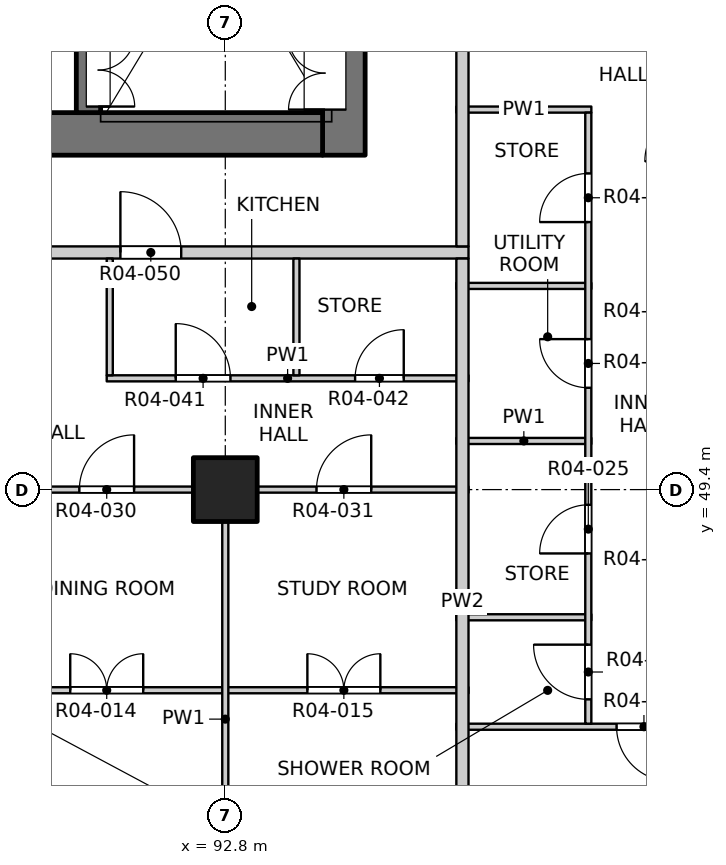
"""IFC4 building model, lengths in metres.
Left out: names, types, materials, properties, quantities, classifications, styles, units other than length and angle.
Written with IfcOpenShell. Run it as: python <this file> out.ifc"""

import sys

from ifc_helpers import new_model, si_unit, direction, frame, frame_2d, origin, origin_2d, place, context, subcontext, project, spatial, rectangle, extrude, element, fill, save


model = new_model("IFC4")
c1 = context("Model", 3, precision=1e-05, world=origin(), true_north=direction((0.0, 1.0)))
c2 = subcontext(c1, "Body", "Model", "MODEL_VIEW")
j1 = project(units=[si_unit("LENGTHUNIT", "METRE"), si_unit("PLANEANGLEUNIT", "RADIAN")], contexts=[c1])
p1 = place(None, origin())
s1 = spatial("IfcSite", under=j1, at=p1, CompositionType="ELEMENT")
p2 = place(p1, origin())
s2 = spatial("IfcBuilding", under=s1, at=p2, CompositionType="ELEMENT")
p3 = place(p2, frame((0.0, 0.0, 58.0)))
s3 = spatial("IfcBuildingStorey", under=s2, at=p3, CompositionType="ELEMENT", Elevation=58.0)
p4 = place(p3, frame((92.8, 49.4, -0.25), z_axis=(0.0, 0.0, 1.0), x_axis=(1.0, 0.0, 0.0)))
e1 = element("IfcColumn", 1, at=p4, inside=s3, PredefinedType="COLUMN", context=c2, shape_type="SweptSolid", body=[
    extrude(rectangle(XDim=1.05, YDim=1.05, at=origin_2d()), origin(), (0.0, 0.0, 1.0), 3.4),
])
p5 = place(p3, frame((94.75, 54.9, -0.25), z_axis=(0.0, 0.0, 1.0), x_axis=(0.0, 1.0, 0.0)))
e2 = element("IfcWall", 2, at=p5, inside=s3, PredefinedType="SOLIDWALL", context=c2, shape_type="SweptSolid", body=[
    extrude(rectangle(XDim=7.05, YDim=0.7, at=frame_2d((3.525, 0.0))), origin(), (0.0, 0.0, 1.0), 3.4),
])
p6 = place(p5, frame((0.75, 0.0, 0.25)))
e3 = element("IfcOpeningElement", 3, at=p6, cuts=e2, PredefinedType="OPENING", context=c2, shape_type="SweptSolid", body=[
    extrude(rectangle(XDim=1.2, YDim=2.1, at=frame_2d((0.6, 1.05))), frame((0.0, 0.36, 0.0), z_axis=(0.0, -1.0, 0.0), x_axis=(1.0, 0.0, 0.0)), (0.0, 0.0, 1.0), 0.72),
])
p7 = place(p3, frame((75.6, 55.25, -0.25), z_axis=(0.0, 0.0, 1.0), x_axis=(1.0, 0.0, 0.0)))
e4 = element("IfcWall", 4, at=p7, inside=s3, PredefinedType="SOLIDWALL", context=c2, shape_type="SweptSolid", body=[
    extrude(rectangle(XDim=18.8, YDim=0.7, at=frame_2d((9.4, 0.0))), origin(), (0.0, 0.0, 1.0), 3.4),
])
p8 = place(p7, frame((8.65, 0.0, 0.25)))
e5 = element("IfcOpeningElement", 5, at=p8, cuts=e4, PredefinedType="OPENING", context=c2, shape_type="SweptSolid", body=[
    extrude(rectangle(XDim=1.5, YDim=2.1, at=frame_2d((0.75, 1.05))), frame((0.0, 0.36, 0.0), z_axis=(0.0, -1.0, 0.0), x_axis=(1.0, 0.0, 0.0)), (0.0, 0.0, 1.0), 0.72),
])
p9 = place(p3, frame((90.55, 55.6, -0.25), z_axis=(0.0, 0.0, 1.0), x_axis=(0.0, 1.0, 0.0)))
e6 = element("IfcWall", 6, at=p9, inside=s3, PredefinedType="SOLIDWALL", context=c2, shape_type="SweptSolid", body=[
    extrude(rectangle(XDim=6.35, YDim=0.4, at=frame_2d((3.175, 0.0))), origin(), (0.0, 0.0, 1.0), 3.4),
])
p10 = place(p9, frame((0.1, 0.0, 0.25)))
e7 = element("IfcOpeningElement", 7, at=p10, cuts=e6, PredefinedType="OPENING", context=c2, shape_type="SweptSolid", body=[
    extrude(rectangle(XDim=1.2, YDim=2.1, at=frame_2d((0.6, 1.05))), frame((0.0, 0.21, 0.0), z_axis=(0.0, -1.0, 0.0), x_axis=(1.0, 0.0, 0.0)), (0.0, 0.0, 1.0), 0.42),
])
p11 = place(p3, frame((96.6, 45.5, 0.0), z_axis=(0.0, 0.0, 1.0), x_axis=(1.0, 0.0, 0.0)))
e8 = element("IfcWall", 8, at=p11, inside=s3, PredefinedType="PARTITIONING", context=c2, shape_type="SweptSolid", body=[
    extrude(rectangle(XDim=11.5, YDim=0.1, at=frame_2d((5.75, 0.0))), origin(), (0.0, 0.0, 1.0), 3.15),
])
p12 = place(p11, frame((2.635, 0.0, 0.0)))
e9 = element("IfcOpeningElement", 9, at=p12, cuts=e8, PredefinedType="OPENING", context=c2, shape_type="SweptSolid", body=[
    extrude(rectangle(XDim=0.9, YDim=2.1, at=frame_2d((0.45, 1.05))), frame((0.0, 0.06, 0.0), z_axis=(0.0, -1.0, 0.0), x_axis=(1.0, 0.0, 0.0)), (0.0, 0.0, 1.0), 0.12),
])
p13 = place(p3, frame((81.0, 46.1, 0.0), z_axis=(0.0, 0.0, 1.0), x_axis=(1.0, 0.0, 0.0)))
e10 = element("IfcWall", 10, at=p13, inside=s3, PredefinedType="PARTITIONING", context=c2, shape_type="SweptSolid", body=[
    extrude(rectangle(XDim=15.8, YDim=0.1, at=frame_2d((7.9, 0.0))), origin(), (0.0, 0.0, 1.0), 3.15),
])
p14 = place(p13, frame((0.625, 0.0, 0.0)))
e11 = element("IfcOpeningElement", 11, at=p14, cuts=e10, PredefinedType="OPENING", context=c2, shape_type="SweptSolid", body=[
    extrude(rectangle(XDim=0.9, YDim=2.1, at=frame_2d((0.45, 1.05))), frame((0.0, 0.06, 0.0), z_axis=(0.0, -1.0, 0.0), x_axis=(1.0, 0.0, 0.0)), (0.0, 0.0, 1.0), 0.12),
])
p15 = place(p13, frame((2.575, 0.0, 0.0)))
e12 = element("IfcOpeningElement", 12, at=p15, cuts=e10, PredefinedType="OPENING", context=c2, shape_type="SweptSolid", body=[
    extrude(rectangle(XDim=0.9, YDim=2.1, at=frame_2d((0.45, 1.05))), frame((0.0, 0.06, 0.0), z_axis=(0.0, -1.0, 0.0), x_axis=(1.0, 0.0, 0.0)), (0.0, 0.0, 1.0), 0.12),
])
p16 = place(p13, frame((4.525, 0.0, 0.0)))
e13 = element("IfcOpeningElement", 13, at=p16, cuts=e10, PredefinedType="OPENING", context=c2, shape_type="SweptSolid", body=[
    extrude(rectangle(XDim=0.9, YDim=2.1, at=frame_2d((0.45, 1.05))), frame((0.0, 0.06, 0.0), z_axis=(0.0, -1.0, 0.0), x_axis=(1.0, 0.0, 0.0)), (0.0, 0.0, 1.0), 0.12),
])
p17 = place(p13, frame((6.475, 0.0, 0.0)))
e14 = element("IfcOpeningElement", 14, at=p17, cuts=e10, PredefinedType="OPENING", context=c2, shape_type="SweptSolid", body=[
    extrude(rectangle(XDim=0.9, YDim=2.1, at=frame_2d((0.45, 1.05))), frame((0.0, 0.06, 0.0), z_axis=(0.0, -1.0, 0.0), x_axis=(1.0, 0.0, 0.0)), (0.0, 0.0, 1.0), 0.12),
])
p18 = place(p13, frame((9.25, 0.0, 0.0)))
e15 = element("IfcOpeningElement", 15, at=p18, cuts=e10, PredefinedType="OPENING", context=c2, shape_type="SweptSolid", body=[
    extrude(rectangle(XDim=1.2, YDim=2.1, at=frame_2d((0.6, 1.05))), frame((0.0, 0.06, 0.0), z_axis=(0.0, -1.0, 0.0), x_axis=(1.0, 0.0, 0.0)), (0.0, 0.0, 1.0), 0.12),
])
p19 = place(p13, frame((13.15, 0.0, 0.0)))
e16 = element("IfcOpeningElement", 16, at=p19, cuts=e10, PredefinedType="OPENING", context=c2, shape_type="SweptSolid", body=[
    extrude(rectangle(XDim=1.2, YDim=2.1, at=frame_2d((0.6, 1.05))), frame((0.0, 0.06, 0.0), z_axis=(0.0, -1.0, 0.0), x_axis=(1.0, 0.0, 0.0)), (0.0, 0.0, 1.0), 0.12),
])
p20 = place(p3, frame((96.6, 47.3, 0.0), z_axis=(0.0, 0.0, 1.0), x_axis=(1.0, 0.0, 0.0)))
e17 = element("IfcWall", 17, at=p20, inside=s3, PredefinedType="PARTITIONING", context=c2, shape_type="SweptSolid", body=[
    extrude(rectangle(XDim=2.22, YDim=0.1, at=frame_2d((1.11, 0.0))), origin(), (0.0, 0.0, 1.0), 3.15),
])
p21 = place(p3, frame((73.2, 49.4, 0.0), z_axis=(0.0, 0.0, 1.0), x_axis=(1.0, 0.0, 0.0)))
e18 = element("IfcWall", 18, at=p21, inside=s3, PredefinedType="PARTITIONING", context=c2, shape_type="SweptSolid", body=[
    extrude(rectangle(XDim=23.6, YDim=0.1, at=frame_2d((11.8, 0.0))), origin(), (0.0, 0.0, 1.0), 3.15),
])
p22 = place(p21, frame((2.425, 0.0, 0.0)))
e19 = element("IfcOpeningElement", 19, at=p22, cuts=e18, PredefinedType="OPENING", context=c2, shape_type="SweptSolid", body=[
    extrude(rectangle(XDim=0.9, YDim=2.1, at=frame_2d((0.45, 1.05))), frame((0.0, 0.06, 0.0), z_axis=(0.0, -1.0, 0.0), x_axis=(1.0, 0.0, 0.0)), (0.0, 0.0, 1.0), 0.12),
])
p23 = place(p21, frame((5.5, 0.0, 0.0)))
e20 = element("IfcOpeningElement", 20, at=p23, cuts=e18, PredefinedType="OPENING", context=c2, shape_type="SweptSolid", body=[
    extrude(rectangle(XDim=0.9, YDim=2.1, at=frame_2d((0.45, 1.05))), frame((0.0, 0.06, 0.0), z_axis=(0.0, -1.0, 0.0), x_axis=(1.0, 0.0, 0.0)), (0.0, 0.0, 1.0), 0.12),
])
p24 = place(p21, frame((10.2, 0.0, 0.0)))
e21 = element("IfcOpeningElement", 21, at=p24, cuts=e18, PredefinedType="OPENING", context=c2, shape_type="SweptSolid", body=[
    extrude(rectangle(XDim=0.9, YDim=2.1, at=frame_2d((0.45, 1.05))), frame((0.0, 0.06, 0.0), z_axis=(0.0, -1.0, 0.0), x_axis=(1.0, 0.0, 0.0)), (0.0, 0.0, 1.0), 0.12),
])
p25 = place(p21, frame((14.275, 0.0, 0.0)))
e22 = element("IfcOpeningElement", 22, at=p25, cuts=e18, PredefinedType="OPENING", context=c2, shape_type="SweptSolid", body=[
    extrude(rectangle(XDim=0.9, YDim=2.1, at=frame_2d((0.45, 1.05))), frame((0.0, 0.06, 0.0), z_axis=(0.0, -1.0, 0.0), x_axis=(1.0, 0.0, 0.0)), (0.0, 0.0, 1.0), 0.12),
])
p26 = place(p21, frame((17.2, 0.0, 0.0)))
e23 = element("IfcOpeningElement", 23, at=p26, cuts=e18, PredefinedType="OPENING", context=c2, shape_type="SweptSolid", body=[
    extrude(rectangle(XDim=0.9, YDim=2.1, at=frame_2d((0.45, 1.05))), frame((0.0, 0.06, 0.0), z_axis=(0.0, -1.0, 0.0), x_axis=(1.0, 0.0, 0.0)), (0.0, 0.0, 1.0), 0.12),
])
p27 = place(p21, frame((21.1, 0.0, 0.0)))
e24 = element("IfcOpeningElement", 24, at=p27, cuts=e18, PredefinedType="OPENING", context=c2, shape_type="SweptSolid", body=[
    extrude(rectangle(XDim=0.9, YDim=2.1, at=frame_2d((0.45, 1.05))), frame((0.0, 0.06, 0.0), z_axis=(0.0, -1.0, 0.0), x_axis=(1.0, 0.0, 0.0)), (0.0, 0.0, 1.0), 0.12),
])
p28 = place(p3, frame((96.6, 50.2, 0.0), z_axis=(0.0, 0.0, 1.0), x_axis=(1.0, 0.0, 0.0)))
e25 = element("IfcWall", 25, at=p28, inside=s3, PredefinedType="PARTITIONING", context=c2, shape_type="SweptSolid", body=[
    extrude(rectangle(XDim=2.22, YDim=0.1, at=frame_2d((1.11, 0.0))), origin(), (0.0, 0.0, 1.0), 3.15),
])
p29 = place(p3, frame((90.85, 51.23, 0.0), z_axis=(0.0, 0.0, 1.0), x_axis=(1.0, 0.0, 0.0)))
e26 = element("IfcWall", 26, at=p29, inside=s3, PredefinedType="PARTITIONING", context=c2, shape_type="SweptSolid", body=[
    extrude(rectangle(XDim=5.95, YDim=0.1, at=frame_2d((2.975, 0.0))), origin(), (0.0, 0.0, 1.0), 3.15),
])
p30 = place(p29, frame((1.135, 0.0, 0.0)))
e27 = element("IfcOpeningElement", 27, at=p30, cuts=e26, PredefinedType="OPENING", context=c2, shape_type="SweptSolid", body=[
    extrude(rectangle(XDim=0.9, YDim=2.1, at=frame_2d((0.45, 1.05))), frame((0.0, 0.06, 0.0), z_axis=(0.0, -1.0, 0.0), x_axis=(1.0, 0.0, 0.0)), (0.0, 0.0, 1.0), 0.12),
])
p31 = place(p29, frame((4.085, 0.0, 0.0)))
e28 = element("IfcOpeningElement", 28, at=p31, cuts=e26, PredefinedType="OPENING", context=c2, shape_type="SweptSolid", body=[
    extrude(rectangle(XDim=0.8, YDim=2.1, at=frame_2d((0.4, 1.05))), frame((0.0, 0.06, 0.0), z_axis=(0.0, -1.0, 0.0), x_axis=(1.0, 0.0, 0.0)), (0.0, 0.0, 1.0), 0.12),
])
p32 = place(p3, frame((96.6, 52.75, 0.0), z_axis=(0.0, 0.0, 1.0), x_axis=(1.0, 0.0, 0.0)))
e29 = element("IfcWall", 29, at=p32, inside=s3, PredefinedType="PARTITIONING", context=c2, shape_type="SweptSolid", body=[
    extrude(rectangle(XDim=2.22, YDim=0.1, at=frame_2d((1.11, 0.0))), origin(), (0.0, 0.0, 1.0), 3.15),
])
p33 = place(p3, frame((73.2, 53.3, 0.0), z_axis=(0.0, 0.0, 1.0), x_axis=(1.0, 0.0, 0.0)))
e30 = element("IfcWall", 30, at=p33, inside=s3, PredefinedType="PARTITIONING", context=c2, shape_type="SweptSolid", body=[
    extrude(rectangle(XDim=23.6, YDim=0.2, at=frame_2d((11.8, 0.0))), origin(), (0.0, 0.0, 1.0), 3.15),
])
p34 = place(p33, frame((2.975, 0.0, 0.0)))
e31 = element("IfcOpeningElement", 31, at=p34, cuts=e30, PredefinedType="OPENING", context=c2, shape_type="SweptSolid", body=[
    extrude(rectangle(XDim=1.0, YDim=2.1, at=frame_2d((0.5, 1.05))), frame((0.0, 0.11, 0.0), z_axis=(0.0, -1.0, 0.0), x_axis=(1.0, 0.0, 0.0)), (0.0, 0.0, 1.0), 0.22),
])
p35 = place(p33, frame((17.875, 0.0, 0.0)))
e32 = element("IfcOpeningElement", 32, at=p35, cuts=e30, PredefinedType="OPENING", context=c2, shape_type="SweptSolid", body=[
    extrude(rectangle(XDim=1.0, YDim=2.1, at=frame_2d((0.5, 1.05))), frame((0.0, 0.11, 0.0), z_axis=(0.0, -1.0, 0.0), x_axis=(1.0, 0.0, 0.0)), (0.0, 0.0, 1.0), 0.22),
])
p36 = place(p3, frame((96.6, 55.65, 0.0), z_axis=(0.0, 0.0, 1.0), x_axis=(1.0, 0.0, 0.0)))
e33 = element("IfcWall", 33, at=p36, inside=s3, PredefinedType="PARTITIONING", context=c2, shape_type="SweptSolid", body=[
    extrude(rectangle(XDim=2.22, YDim=0.1, at=frame_2d((1.11, 0.0))), origin(), (0.0, 0.0, 1.0), 3.15),
])
p37 = place(p3, frame((90.9, 51.28, 0.0), z_axis=(0.0, 0.0, 1.0), x_axis=(0.0, 1.0, 0.0)))
e34 = element("IfcWall", 34, at=p37, inside=s3, PredefinedType="PARTITIONING", context=c2, shape_type="SweptSolid", body=[
    extrude(rectangle(XDim=1.92, YDim=0.1, at=frame_2d((0.96, 0.0))), origin(), (0.0, 0.0, 1.0), 3.15),
])
p38 = place(p3, frame((92.8, 41.9, 0.0), z_axis=(0.0, 0.0, 1.0), x_axis=(0.0, 1.0, 0.0)))
e35 = element("IfcWall", 35, at=p38, inside=s3, PredefinedType="PARTITIONING", context=c2, shape_type="SweptSolid", body=[
    extrude(rectangle(XDim=7.45, YDim=0.1, at=frame_2d((3.725, 0.0))), origin(), (0.0, 0.0, 1.0), 2.55),
])
p39 = place(p3, frame((93.97, 51.28, 0.0), z_axis=(0.0, 0.0, 1.0), x_axis=(0.0, 1.0, 0.0)))
e36 = element("IfcWall", 36, at=p39, inside=s3, PredefinedType="PARTITIONING", context=c2, shape_type="SweptSolid", body=[
    extrude(rectangle(XDim=1.92, YDim=0.1, at=frame_2d((0.96, 0.0))), origin(), (0.0, 0.0, 1.0), 3.15),
])
p40 = place(p3, frame((96.7, 41.9, 0.0), z_axis=(0.0, 0.0, 1.0), x_axis=(0.0, 1.0, 0.0)))
e37 = element("IfcWall", 37, at=p40, inside=s3, PredefinedType="PARTITIONING", context=c2, shape_type="SweptSolid", body=[
    extrude(rectangle(XDim=11.3, YDim=0.2, at=frame_2d((5.65, 0.0))), origin(), (0.0, 0.0, 1.0), 3.15),
])
p41 = place(p3, frame((96.7, 53.4, 0.0), z_axis=(0.0, 0.0, 1.0), x_axis=(0.0, 1.0, 0.0)))
e38 = element("IfcWall", 38, at=p41, inside=s3, PredefinedType="PARTITIONING", context=c2, shape_type="SweptSolid", body=[
    extrude(rectangle(XDim=31.0, YDim=0.2, at=frame_2d((15.5, 0.0))), origin(), (0.0, 0.0, 1.0), 3.15),
])
p42 = place(p41, frame((3.525, 0.0, 0.0)))
e39 = element("IfcOpeningElement", 39, at=p42, cuts=e38, PredefinedType="OPENING", context=c2, shape_type="SweptSolid", body=[
    extrude(rectangle(XDim=1.0, YDim=2.1, at=frame_2d((0.5, 1.05))), frame((0.0, 0.11, 0.0), z_axis=(0.0, -1.0, 0.0), x_axis=(1.0, 0.0, 0.0)), (0.0, 0.0, 1.0), 0.22),
])
p43 = place(p41, frame((10.825, 0.0, 0.0)))
e40 = element("IfcOpeningElement", 40, at=p43, cuts=e38, PredefinedType="OPENING", context=c2, shape_type="SweptSolid", body=[
    extrude(rectangle(XDim=1.0, YDim=2.1, at=frame_2d((0.5, 1.05))), frame((0.0, 0.11, 0.0), z_axis=(0.0, -1.0, 0.0), x_axis=(1.0, 0.0, 0.0)), (0.0, 0.0, 1.0), 0.22),
])
p44 = place(p41, frame((25.975, 0.0, 0.0)))
e41 = element("IfcOpeningElement", 41, at=p44, cuts=e38, PredefinedType="OPENING", context=c2, shape_type="SweptSolid", body=[
    extrude(rectangle(XDim=1.0, YDim=2.1, at=frame_2d((0.5, 1.05))), frame((0.0, 0.11, 0.0), z_axis=(0.0, -1.0, 0.0), x_axis=(1.0, 0.0, 0.0)), (0.0, 0.0, 1.0), 0.22),
])
p45 = place(p3, frame((98.77, 45.55, 0.0), z_axis=(0.0, 0.0, 1.0), x_axis=(0.0, 1.0, 0.0)))
e42 = element("IfcWall", 42, at=p45, inside=s3, PredefinedType="PARTITIONING", context=c2, shape_type="SweptSolid", body=[
    extrude(rectangle(XDim=10.05, YDim=0.1, at=frame_2d((5.025, 0.0))), origin(), (0.0, 0.0, 1.0), 3.15),
])
p46 = place(p45, frame((0.4, 0.0, 0.0)))
e43 = element("IfcOpeningElement", 43, at=p46, cuts=e42, PredefinedType="OPENING", context=c2, shape_type="SweptSolid", body=[
    extrude(rectangle(XDim=0.9, YDim=2.1, at=frame_2d((0.45, 1.05))), frame((0.0, 0.06, 0.0), z_axis=(0.0, -1.0, 0.0), x_axis=(1.0, 0.0, 0.0)), (0.0, 0.0, 1.0), 0.12),
])
p47 = place(p45, frame((2.8, 0.0, 0.0)))
e44 = element("IfcOpeningElement", 44, at=p47, cuts=e42, PredefinedType="OPENING", context=c2, shape_type="SweptSolid", body=[
    extrude(rectangle(XDim=0.8, YDim=2.1, at=frame_2d((0.4, 1.05))), frame((0.0, 0.06, 0.0), z_axis=(0.0, -1.0, 0.0), x_axis=(1.0, 0.0, 0.0)), (0.0, 0.0, 1.0), 0.12),
])
p48 = place(p45, frame((5.525, 0.0, 0.0)))
e45 = element("IfcOpeningElement", 45, at=p48, cuts=e42, PredefinedType="OPENING", context=c2, shape_type="SweptSolid", body=[
    extrude(rectangle(XDim=0.8, YDim=2.1, at=frame_2d((0.4, 1.05))), frame((0.0, 0.06, 0.0), z_axis=(0.0, -1.0, 0.0), x_axis=(1.0, 0.0, 0.0)), (0.0, 0.0, 1.0), 0.12),
])
p49 = place(p45, frame((8.25, 0.0, 0.0)))
e46 = element("IfcOpeningElement", 46, at=p49, cuts=e42, PredefinedType="OPENING", context=c2, shape_type="SweptSolid", body=[
    extrude(rectangle(XDim=0.8, YDim=2.1, at=frame_2d((0.4, 1.05))), frame((0.0, 0.06, 0.0), z_axis=(0.0, -1.0, 0.0), x_axis=(1.0, 0.0, 0.0)), (0.0, 0.0, 1.0), 0.12),
])
p50 = place(p12, origin())
e47 = element("IfcDoor", 47, at=p50, inside=s3, OperationType="SINGLE_SWING_LEFT", PredefinedType="DOOR", context=c2, shape_type="SweptSolid", body=[
    extrude(rectangle(XDim=0.9, YDim=2.1, at=frame_2d((0.45, 1.05))), frame((0.0, 0.025, 0.0), z_axis=(0.0, -1.0, 0.0), x_axis=(1.0, 0.0, 0.0)), (0.0, 0.0, 1.0), 0.05),
])
fill(e9, e47)
p51 = place(p18, origin())
e48 = element("IfcDoor", 48, at=p51, inside=s3, OperationType="DOUBLE_DOOR_SINGLE_SWING", PredefinedType="DOOR", context=c2, shape_type="SweptSolid", body=[
    extrude(rectangle(XDim=1.2, YDim=2.1, at=frame_2d((0.6, 1.05))), frame((0.0, 0.025, 0.0), z_axis=(0.0, -1.0, 0.0), x_axis=(1.0, 0.0, 0.0)), (0.0, 0.0, 1.0), 0.05),
])
fill(e15, e48)
p52 = place(p19, origin())
e49 = element("IfcDoor", 49, at=p52, inside=s3, OperationType="DOUBLE_DOOR_SINGLE_SWING", PredefinedType="DOOR", context=c2, shape_type="SweptSolid", body=[
    extrude(rectangle(XDim=1.2, YDim=2.1, at=frame_2d((0.6, 1.05))), frame((0.0, 0.025, 0.0), z_axis=(0.0, -1.0, 0.0), x_axis=(1.0, 0.0, 0.0)), (0.0, 0.0, 1.0), 0.05),
])
fill(e16, e49)
p53 = place(p46, origin())
e50 = element("IfcDoor", 50, at=p53, inside=s3, OperationType="SINGLE_SWING_RIGHT", PredefinedType="DOOR", context=c2, shape_type="SweptSolid", body=[
    extrude(rectangle(XDim=0.9, YDim=2.1, at=frame_2d((0.45, 1.05))), frame((0.0, 0.025, 0.0), z_axis=(0.0, -1.0, 0.0), x_axis=(1.0, 0.0, 0.0)), (0.0, 0.0, 1.0), 0.05),
])
fill(e43, e50)
p54 = place(p47, origin())
e51 = element("IfcDoor", 51, at=p54, inside=s3, OperationType="SINGLE_SWING_LEFT", PredefinedType="DOOR", context=c2, shape_type="SweptSolid", body=[
    extrude(rectangle(XDim=0.8, YDim=2.1, at=frame_2d((0.4, 1.05))), frame((0.0, 0.025, 0.0), z_axis=(0.0, -1.0, 0.0), x_axis=(1.0, 0.0, 0.0)), (0.0, 0.0, 1.0), 0.05),
])
fill(e44, e51)
p55 = place(p26, origin())
e52 = element("IfcDoor", 52, at=p55, inside=s3, OperationType="SINGLE_SWING_RIGHT", PredefinedType="DOOR", context=c2, shape_type="SweptSolid", body=[
    extrude(rectangle(XDim=0.9, YDim=2.1, at=frame_2d((0.45, 1.05))), frame((0.0, 0.025, 0.0), z_axis=(0.0, -1.0, 0.0), x_axis=(1.0, 0.0, 0.0)), (0.0, 0.0, 1.0), 0.05),
])
fill(e23, e52)
p56 = place(p27, origin())
e53 = element("IfcDoor", 53, at=p56, inside=s3, OperationType="SINGLE_SWING_RIGHT", PredefinedType="DOOR", context=c2, shape_type="SweptSolid", body=[
    extrude(rectangle(XDim=0.9, YDim=2.1, at=frame_2d((0.45, 1.05))), frame((0.0, 0.025, 0.0), z_axis=(0.0, -1.0, 0.0), x_axis=(1.0, 0.0, 0.0)), (0.0, 0.0, 1.0), 0.05),
])
fill(e24, e53)
p57 = place(p30, origin())
e54 = element("IfcDoor", 54, at=p57, inside=s3, OperationType="SINGLE_SWING_LEFT", PredefinedType="DOOR", context=c2, shape_type="SweptSolid", body=[
    extrude(rectangle(XDim=0.9, YDim=2.1, at=frame_2d((0.45, 1.05))), frame((0.0, 0.025, 0.0), z_axis=(0.0, -1.0, 0.0), x_axis=(1.0, 0.0, 0.0)), (0.0, 0.0, 1.0), 0.05),
])
fill(e27, e54)
p58 = place(p31, origin())
e55 = element("IfcDoor", 55, at=p58, inside=s3, OperationType="SINGLE_SWING_RIGHT", PredefinedType="DOOR", context=c2, shape_type="SweptSolid", body=[
    extrude(rectangle(XDim=0.8, YDim=2.1, at=frame_2d((0.4, 1.05))), frame((0.0, 0.025, 0.0), z_axis=(0.0, -1.0, 0.0), x_axis=(1.0, 0.0, 0.0)), (0.0, 0.0, 1.0), 0.05),
])
fill(e28, e55)
p59 = place(p48, origin())
e56 = element("IfcDoor", 56, at=p59, inside=s3, OperationType="SINGLE_SWING_RIGHT", PredefinedType="DOOR", context=c2, shape_type="SweptSolid", body=[
    extrude(rectangle(XDim=0.8, YDim=2.1, at=frame_2d((0.4, 1.05))), frame((0.0, 0.025, 0.0), z_axis=(0.0, -1.0, 0.0), x_axis=(1.0, 0.0, 0.0)), (0.0, 0.0, 1.0), 0.05),
])
fill(e45, e56)
p60 = place(p35, origin())
e57 = element("IfcDoor", 57, at=p60, inside=s3, OperationType="SINGLE_SWING_LEFT", PredefinedType="DOOR", context=c2, shape_type="SweptSolid", body=[
    extrude(rectangle(XDim=1.0, YDim=2.1, at=frame_2d((0.5, 1.05))), frame((0.0, 0.025, 0.0), z_axis=(0.0, -1.0, 0.0), x_axis=(1.0, 0.0, 0.0)), (0.0, 0.0, 1.0), 0.05),
])
fill(e32, e57)
p61 = place(p49, origin())
e58 = element("IfcDoor", 58, at=p61, inside=s3, OperationType="SINGLE_SWING_LEFT", PredefinedType="DOOR", context=c2, shape_type="SweptSolid", body=[
    extrude(rectangle(XDim=0.8, YDim=2.1, at=frame_2d((0.4, 1.05))), frame((0.0, 0.025, 0.0), z_axis=(0.0, -1.0, 0.0), x_axis=(1.0, 0.0, 0.0)), (0.0, 0.0, 1.0), 0.05),
])
fill(e46, e58)
p62 = place(p10, origin())
e59 = element("IfcDoor", 59, at=p62, inside=s3, OperationType="DOUBLE_DOOR_SINGLE_SWING", PredefinedType="DOOR", context=c2, shape_type="SweptSolid", body=[
    extrude(rectangle(XDim=1.2, YDim=2.1, at=frame_2d((0.6, 1.05))), frame((0.0, -0.135, 0.0), z_axis=(0.0, -1.0, 0.0), x_axis=(1.0, 0.0, 0.0)), (0.0, 0.0, 1.0), 0.05),
])
fill(e7, e59)
p63 = place(p6, origin())
e60 = element("IfcDoor", 60, at=p63, inside=s3, OperationType="DOUBLE_DOOR_SINGLE_SWING", PredefinedType="DOOR", context=c2, shape_type="SweptSolid", body=[
    extrude(rectangle(XDim=1.2, YDim=2.1, at=frame_2d((0.6, 1.05))), frame((0.0, 0.335, 0.0), z_axis=(0.0, -1.0, 0.0), x_axis=(1.0, 0.0, 0.0)), (0.0, 0.0, 1.0), 0.05),
])
fill(e3, e60)
save(model, sys.argv[1])
